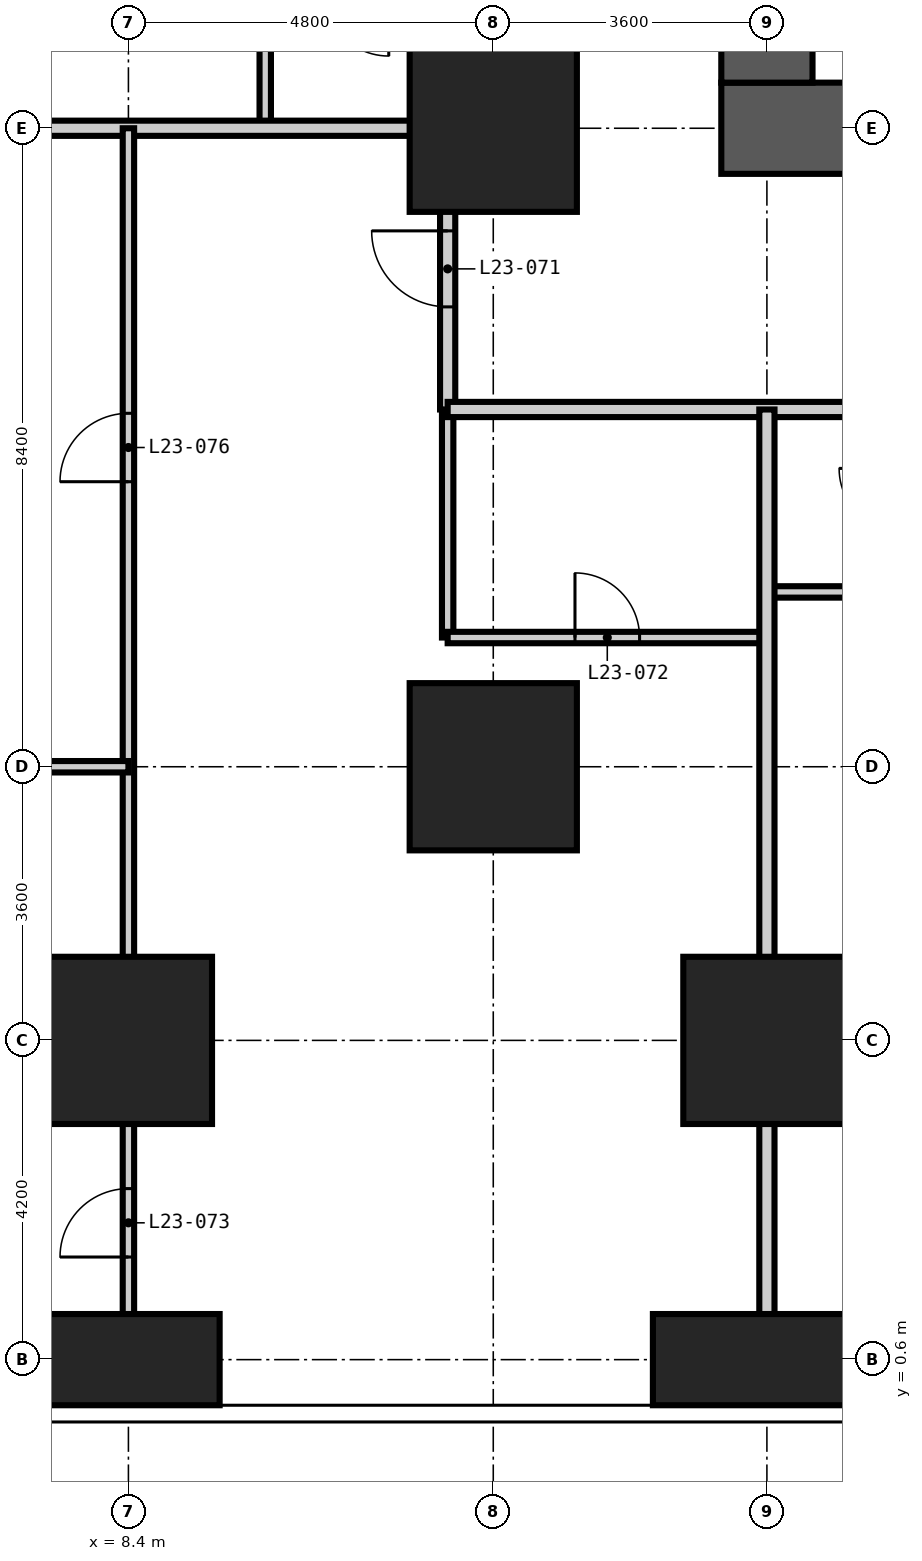
"""IFC4 building model, lengths in metres.
Left out: names, types, materials, properties, quantities, classifications, styles, units other than length and angle.
Written with IfcOpenShell. Run it as: python <this file> out.ifc"""

import sys

from ifc_helpers import new_model, si_unit, direction, frame, frame_2d, origin, origin_2d, place, context, subcontext, project, spatial, rectangle, extrude, element, fill, save


model = new_model("IFC4")
c1 = context("Model", 3, precision=1e-05, world=origin(), true_north=direction((0.0, 1.0)))
c2 = subcontext(c1, "Body", "Model", "MODEL_VIEW")
j1 = project(units=[si_unit("LENGTHUNIT", "METRE"), si_unit("PLANEANGLEUNIT", "RADIAN")], contexts=[c1])
p1 = place(None, origin())
s1 = spatial("IfcSite", under=j1, at=p1, CompositionType="ELEMENT")
p2 = place(p1, origin())
s2 = spatial("IfcBuilding", under=s1, at=p2, CompositionType="ELEMENT")
p3 = place(p2, frame((0.0, 0.0, 93.6)))
s3 = spatial("IfcBuildingStorey", under=s2, at=p3, CompositionType="ELEMENT", Elevation=93.6)
p4 = place(p3, frame((8.4, 0.6, -0.35), z_axis=(0.0, 0.0, 1.0), x_axis=(1.0, 0.0, 0.0)))
e1 = element("IfcColumn", 1, at=p4, inside=s3, PredefinedType="COLUMN", context=c2, shape_type="SweptSolid", body=[
    extrude(rectangle(XDim=2.4, YDim=1.2, at=origin_2d()), origin(), (0.0, 0.0, 1.0), 3.6),
])
for number, where, z_axis, x_axis in (
    (2, (8.4, 4.8, -0.35), (0.0, 0.0, 1.0), (1.0, 0.0, 0.0)),
    (3, (13.2, 8.4, -0.35), (0.0, 0.0, 1.0), (1.0, 0.0, 0.0)),
    (4, (13.2, 16.8, -0.35), (0.0, 0.0, 1.0), (1.0, 0.0, 0.0)),
):
    element("IfcColumn", number, at=place(p3, frame(where, z_axis=z_axis, x_axis=x_axis)), inside=s3, PredefinedType="COLUMN", context=c2, shape_type="SweptSolid", body=[
        extrude(rectangle(XDim=2.2, YDim=2.2, at=origin_2d()), origin(), (0.0, 0.0, 1.0), 3.6),
    ])
p5 = place(p3, frame((16.8, 0.6, -0.35), z_axis=(0.0, 0.0, 1.0), x_axis=(1.0, 0.0, 0.0)))
e5 = element("IfcColumn", 5, at=p5, inside=s3, PredefinedType="COLUMN", context=c2, shape_type="SweptSolid", body=[
    extrude(rectangle(XDim=3.0, YDim=1.2, at=origin_2d()), origin(), (0.0, 0.0, 1.0), 3.6),
])
p6 = place(p3, frame((16.8, 4.8, -0.35), z_axis=(0.0, 0.0, 1.0), x_axis=(1.0, 0.0, 0.0)))
e6 = element("IfcColumn", 6, at=p6, inside=s3, PredefinedType="COLUMN", context=c2, shape_type="SweptSolid", body=[
    extrude(rectangle(XDim=2.2, YDim=2.2, at=origin_2d()), origin(), (0.0, 0.0, 1.0), 3.6),
])
p7 = place(p3, frame((16.2, 16.8, -0.35), z_axis=(0.0, 0.0, 1.0), x_axis=(1.0, 0.0, 0.0)))
e7 = element("IfcWall", 7, at=p7, inside=s3, PredefinedType="SHEAR", context=c2, shape_type="SweptSolid", body=[
    extrude(rectangle(XDim=26.4, YDim=1.2, at=frame_2d((13.2, 0.0))), origin(), (0.0, 0.0, 1.0), 3.6),
])
p8 = place(p7, frame((12.7, 0.0, 0.35)))
e8 = element("IfcOpeningElement", 8, at=p8, cuts=e7, PredefinedType="OPENING", context=c2, shape_type="SweptSolid", body=[
    extrude(rectangle(XDim=1.0, YDim=2.1, at=frame_2d((0.5, 1.05))), frame((0.0, 0.61, 0.0), z_axis=(0.0, -1.0, 0.0), x_axis=(1.0, 0.0, 0.0)), (0.0, 0.0, 1.0), 1.22),
])
p9 = place(p7, frame((19.0, 0.0, 0.35)))
e9 = element("IfcOpeningElement", 9, at=p9, cuts=e7, PredefinedType="OPENING", context=c2, shape_type="SweptSolid", body=[
    extrude(rectangle(XDim=1.0, YDim=2.1, at=frame_2d((0.5, 1.05))), frame((0.0, 0.61, 0.0), z_axis=(0.0, -1.0, 0.0), x_axis=(1.0, 0.0, 0.0)), (0.0, 0.0, 1.0), 1.22),
])
p10 = place(p3, frame((16.8, 41.4, -0.35), z_axis=(0.0, 0.0, 1.0), x_axis=(0.0, -1.0, 0.0)))
e10 = element("IfcWall", 10, at=p10, inside=s3, PredefinedType="SHEAR", context=c2, shape_type="SweptSolid", body=[
    extrude(rectangle(XDim=24.0, YDim=1.2, at=frame_2d((12.0, 0.0))), origin(), (0.0, 0.0, 1.0), 3.6),
])
p11 = place(p10, frame((11.1, 0.0, 0.35)))
e11 = element("IfcOpeningElement", 11, at=p11, cuts=e10, PredefinedType="OPENING", context=c2, shape_type="SweptSolid", body=[
    extrude(rectangle(XDim=1.8, YDim=2.2, at=frame_2d((0.9, 1.1))), frame((0.0, 0.61, 0.0), z_axis=(0.0, -1.0, 0.0), x_axis=(1.0, 0.0, 0.0)), (0.0, 0.0, 1.0), 1.22),
])
p12 = place(p10, frame((19.9, 0.0, 0.35)))
e12 = element("IfcOpeningElement", 12, at=p12, cuts=e10, PredefinedType="OPENING", context=c2, shape_type="SweptSolid", body=[
    extrude(rectangle(XDim=1.0, YDim=2.1, at=frame_2d((0.5, 1.05))), frame((0.0, 0.61, 0.0), z_axis=(0.0, -1.0, 0.0), x_axis=(1.0, 0.0, 0.0)), (0.0, 0.0, 1.0), 1.22),
])
p13 = place(p10, frame((5.2, 0.0, 0.35)))
e13 = element("IfcOpeningElement", 13, at=p13, cuts=e10, PredefinedType="OPENING", context=c2, shape_type="SweptSolid", body=[
    extrude(rectangle(XDim=1.0, YDim=2.1, at=frame_2d((0.5, 1.05))), frame((0.0, 0.61, 0.0), z_axis=(0.0, -1.0, 0.0), x_axis=(1.0, 0.0, 0.0)), (0.0, 0.0, 1.0), 1.22),
])
p14 = place(p3, frame((10.2, 16.8, 0.0), z_axis=(0.0, 0.0, 1.0), x_axis=(0.0, 1.0, 0.0)))
e14 = element("IfcWall", 14, at=p14, inside=s3, PredefinedType="PARTITIONING", context=c2, shape_type="SweptSolid", body=[
    extrude(rectangle(XDim=1.8, YDim=0.15, at=frame_2d((0.9, 0.0))), origin(), (0.0, 0.0, 1.0), 3.25),
])
for number, where, z_axis, x_axis in (
    (15, (12.6, 10.1, 0.0), (0.0, 0.0, 1.0), (0.0, 1.0, 0.0)),
    (16, (5.4, 4.8, 0.0), (0.0, 0.0, 1.0), (1.0, 0.0, 0.0)),
):
    element("IfcWall", number, at=place(p3, frame(where, z_axis=z_axis, x_axis=x_axis)), inside=s3, PredefinedType="PARTITIONING", context=c2, shape_type="SweptSolid", body=[
        extrude(rectangle(XDim=3.0, YDim=0.15, at=frame_2d((1.5, 0.0))), origin(), (0.0, 0.0, 1.0), 3.25),
    ])
p15 = place(p3, frame((12.6, 10.1, 0.0), z_axis=(0.0, 0.0, 1.0), x_axis=(1.0, 0.0, 0.0)))
e17 = element("IfcWall", 17, at=p15, inside=s3, PredefinedType="PARTITIONING", context=c2, shape_type="SweptSolid", body=[
    extrude(rectangle(XDim=4.2, YDim=0.15, at=frame_2d((2.1, 0.0))), origin(), (0.0, 0.0, 1.0), 3.25),
])
p16 = place(p15, frame((1.675, 0.0, 0.0)))
e18 = element("IfcOpeningElement", 18, at=p16, cuts=e17, PredefinedType="OPENING", context=c2, shape_type="SweptSolid", body=[
    extrude(rectangle(XDim=0.85, YDim=2.1, at=frame_2d((0.425, 1.05))), frame((0.0, 0.085, 0.0), z_axis=(0.0, -1.0, 0.0), x_axis=(1.0, 0.0, 0.0)), (0.0, 0.0, 1.0), 0.17),
])
p17 = place(p3, frame((16.8, 10.7, 0.0), z_axis=(0.0, 0.0, 1.0), x_axis=(1.0, 0.0, 0.0)))
e19 = element("IfcWall", 19, at=p17, inside=s3, PredefinedType="PARTITIONING", context=c2, shape_type="SweptSolid", body=[
    extrude(rectangle(XDim=1.8, YDim=0.15, at=frame_2d((0.9, 0.0))), origin(), (0.0, 0.0, 1.0), 3.25),
])
p18 = place(p3, frame((12.6, 13.1, 0.0), z_axis=(0.0, 0.0, 1.0), x_axis=(0.0, 1.0, 0.0)))
e20 = element("IfcWall", 20, at=p18, inside=s3, PredefinedType="PARTITIONING", context=c2, shape_type="SweptSolid", body=[
    extrude(rectangle(XDim=31.4, YDim=0.2, at=frame_2d((15.7, 0.0))), origin(), (0.0, 0.0, 1.0), 3.25),
])
p19 = place(p18, frame((6.2, 0.0, 0.0)))
e21 = element("IfcOpeningElement", 21, at=p19, cuts=e20, PredefinedType="OPENING", context=c2, shape_type="SweptSolid", body=[
    extrude(rectangle(XDim=1.0, YDim=2.2, at=frame_2d((0.5, 1.1))), frame((0.0, 0.11, 0.0), z_axis=(0.0, -1.0, 0.0), x_axis=(1.0, 0.0, 0.0)), (0.0, 0.0, 1.0), 0.22),
])
p20 = place(p18, frame((17.0, 0.0, 0.0)))
e22 = element("IfcOpeningElement", 22, at=p20, cuts=e20, PredefinedType="OPENING", context=c2, shape_type="SweptSolid", body=[
    extrude(rectangle(XDim=1.0, YDim=2.2, at=frame_2d((0.5, 1.1))), frame((0.0, 0.11, 0.0), z_axis=(0.0, -1.0, 0.0), x_axis=(1.0, 0.0, 0.0)), (0.0, 0.0, 1.0), 0.22),
])
p21 = place(p18, frame((23.0, 0.0, 0.0)))
e23 = element("IfcOpeningElement", 23, at=p21, cuts=e20, PredefinedType="OPENING", context=c2, shape_type="SweptSolid", body=[
    extrude(rectangle(XDim=1.0, YDim=2.2, at=frame_2d((0.5, 1.1))), frame((0.0, 0.11, 0.0), z_axis=(0.0, -1.0, 0.0), x_axis=(1.0, 0.0, 0.0)), (0.0, 0.0, 1.0), 0.22),
])
p22 = place(p18, frame((1.35, 0.0, 0.0)))
e24 = element("IfcOpeningElement", 24, at=p22, cuts=e20, PredefinedType="OPENING", context=c2, shape_type="SweptSolid", body=[
    extrude(rectangle(XDim=1.0, YDim=2.2, at=frame_2d((0.5, 1.1))), frame((0.0, 0.11, 0.0), z_axis=(0.0, -1.0, 0.0), x_axis=(1.0, 0.0, 0.0)), (0.0, 0.0, 1.0), 0.22),
])
p23 = place(p18, frame((30.05, 0.0, 0.0)))
e25 = element("IfcOpeningElement", 25, at=p23, cuts=e20, PredefinedType="OPENING", context=c2, shape_type="SweptSolid", body=[
    extrude(rectangle(XDim=1.0, YDim=2.2, at=frame_2d((0.5, 1.1))), frame((0.0, 0.11, 0.0), z_axis=(0.0, -1.0, 0.0), x_axis=(1.0, 0.0, 0.0)), (0.0, 0.0, 1.0), 0.22),
])
p24 = place(p3, frame((45.1, 13.1, 0.0), z_axis=(0.0, 0.0, 1.0), x_axis=(-1.0, 0.0, 0.0)))
e26 = element("IfcWall", 26, at=p24, inside=s3, PredefinedType="PARTITIONING", context=c2, shape_type="SweptSolid", body=[
    extrude(rectangle(XDim=32.5, YDim=0.2, at=frame_2d((16.25, 0.0))), origin(), (0.0, 0.0, 1.0), 3.25),
])
p25 = place(p24, frame((24.8, 0.0, 0.0)))
e27 = element("IfcOpeningElement", 27, at=p25, cuts=e26, PredefinedType="OPENING", context=c2, shape_type="SweptSolid", body=[
    extrude(rectangle(XDim=1.0, YDim=2.2, at=frame_2d((0.5, 1.1))), frame((0.0, 0.11, 0.0), z_axis=(0.0, -1.0, 0.0), x_axis=(1.0, 0.0, 0.0)), (0.0, 0.0, 1.0), 0.22),
])
p26 = place(p24, frame((14.0, 0.0, 0.0)))
e28 = element("IfcOpeningElement", 28, at=p26, cuts=e26, PredefinedType="OPENING", context=c2, shape_type="SweptSolid", body=[
    extrude(rectangle(XDim=1.0, YDim=2.2, at=frame_2d((0.5, 1.1))), frame((0.0, 0.11, 0.0), z_axis=(0.0, -1.0, 0.0), x_axis=(1.0, 0.0, 0.0)), (0.0, 0.0, 1.0), 0.22),
])
p27 = place(p24, frame((8.0, 0.0, 0.0)))
e29 = element("IfcOpeningElement", 29, at=p27, cuts=e26, PredefinedType="OPENING", context=c2, shape_type="SweptSolid", body=[
    extrude(rectangle(XDim=1.0, YDim=2.2, at=frame_2d((0.5, 1.1))), frame((0.0, 0.11, 0.0), z_axis=(0.0, -1.0, 0.0), x_axis=(1.0, 0.0, 0.0)), (0.0, 0.0, 1.0), 0.22),
])
p28 = place(p3, frame((16.8, -0.018, 0.0), z_axis=(0.0, 0.0, 1.0), x_axis=(0.0, 1.0, 0.0)))
e30 = element("IfcWall", 30, at=p28, inside=s3, PredefinedType="PARTITIONING", context=c2, shape_type="SweptSolid", body=[
    extrude(rectangle(XDim=13.118, YDim=0.2, at=frame_2d((6.559, 0.0))), origin(), (0.0, 0.0, 1.0), 3.25),
])
p29 = place(p3, frame((-0.018, 16.8, 0.0), z_axis=(0.0, 0.0, 1.0), x_axis=(1.0, 0.0, 0.0)))
e31 = element("IfcWall", 31, at=p29, inside=s3, PredefinedType="PARTITIONING", context=c2, shape_type="SweptSolid", body=[
    extrude(rectangle(XDim=12.618, YDim=0.2, at=frame_2d((6.309, 0.0))), origin(), (0.0, 0.0, 1.0), 3.25),
])
p30 = place(p3, frame((8.4, -0.018, 0.0), z_axis=(0.0, 0.0, 1.0), x_axis=(0.0, 1.0, 0.0)))
e32 = element("IfcWall", 32, at=p30, inside=s3, PredefinedType="PARTITIONING", context=c2, shape_type="SweptSolid", body=[
    extrude(rectangle(XDim=16.818, YDim=0.15, at=frame_2d((8.409, 0.0))), origin(), (0.0, 0.0, 1.0), 3.25),
])
p31 = place(p30, frame((1.968, 0.0, 0.0)))
e33 = element("IfcOpeningElement", 33, at=p31, cuts=e32, PredefinedType="OPENING", context=c2, shape_type="SweptSolid", body=[
    extrude(rectangle(XDim=0.9, YDim=2.1, at=frame_2d((0.45, 1.05))), frame((0.0, 0.085, 0.0), z_axis=(0.0, -1.0, 0.0), x_axis=(1.0, 0.0, 0.0)), (0.0, 0.0, 1.0), 0.17),
])
p32 = place(p30, frame((12.168, 0.0, 0.0)))
e34 = element("IfcOpeningElement", 34, at=p32, cuts=e32, PredefinedType="OPENING", context=c2, shape_type="SweptSolid", body=[
    extrude(rectangle(XDim=0.9, YDim=2.1, at=frame_2d((0.45, 1.05))), frame((0.0, 0.085, 0.0), z_axis=(0.0, -1.0, 0.0), x_axis=(1.0, 0.0, 0.0)), (0.0, 0.0, 1.0), 0.17),
])
p33 = place(p3, frame((-0.018, 8.4, 0.0), z_axis=(0.0, 0.0, 1.0), x_axis=(1.0, 0.0, 0.0)))
e35 = element("IfcWall", 35, at=p33, inside=s3, PredefinedType="PARTITIONING", context=c2, shape_type="SweptSolid", body=[
    extrude(rectangle(XDim=8.418, YDim=0.15, at=frame_2d((4.209, 0.0))), origin(), (0.0, 0.0, 1.0), 3.25),
])
p34 = place(p33, frame((2.768, 0.0, 0.0)))
e36 = element("IfcOpeningElement", 36, at=p34, cuts=e35, PredefinedType="OPENING", context=c2, shape_type="SweptSolid", body=[
    extrude(rectangle(XDim=0.9, YDim=2.1, at=frame_2d((0.45, 1.05))), frame((0.0, 0.085, 0.0), z_axis=(0.0, -1.0, 0.0), x_axis=(1.0, 0.0, 0.0)), (0.0, 0.0, 1.0), 0.17),
])
p35 = place(p22, origin())
e37 = element("IfcDoor", 37, at=p35, inside=s3, OperationType="SINGLE_SWING_RIGHT", PredefinedType="DOOR", context=c2, shape_type="SweptSolid", body=[
    extrude(rectangle(XDim=1.0, YDim=2.2, at=frame_2d((0.5, 1.1))), frame((0.0, 0.025, 0.0), z_axis=(0.0, -1.0, 0.0), x_axis=(1.0, 0.0, 0.0)), (0.0, 0.0, 1.0), 0.05),
])
fill(e24, e37)
p36 = place(p16, origin())
e38 = element("IfcDoor", 38, at=p36, inside=s3, OperationType="SINGLE_SWING_LEFT", PredefinedType="DOOR", context=c2, shape_type="SweptSolid", body=[
    extrude(rectangle(XDim=0.85, YDim=2.1, at=frame_2d((0.425, 1.05))), frame((0.0, 0.025, 0.0), z_axis=(0.0, -1.0, 0.0), x_axis=(1.0, 0.0, 0.0)), (0.0, 0.0, 1.0), 0.05),
])
fill(e18, e38)
p37 = place(p31, origin())
e39 = element("IfcDoor", 39, at=p37, inside=s3, OperationType="SINGLE_SWING_LEFT", PredefinedType="DOOR", context=c2, shape_type="SweptSolid", body=[
    extrude(rectangle(XDim=0.9, YDim=2.1, at=frame_2d((0.45, 1.05))), frame((0.0, 0.025, 0.0), z_axis=(0.0, -1.0, 0.0), x_axis=(1.0, 0.0, 0.0)), (0.0, 0.0, 1.0), 0.05),
])
fill(e33, e39)
p38 = place(p32, origin())
e40 = element("IfcDoor", 40, at=p38, inside=s3, OperationType="SINGLE_SWING_LEFT", PredefinedType="DOOR", context=c2, shape_type="SweptSolid", body=[
    extrude(rectangle(XDim=0.9, YDim=2.1, at=frame_2d((0.45, 1.05))), frame((0.0, 0.025, 0.0), z_axis=(0.0, -1.0, 0.0), x_axis=(1.0, 0.0, 0.0)), (0.0, 0.0, 1.0), 0.05),
])
fill(e34, e40)
save(model, sys.argv[1])
